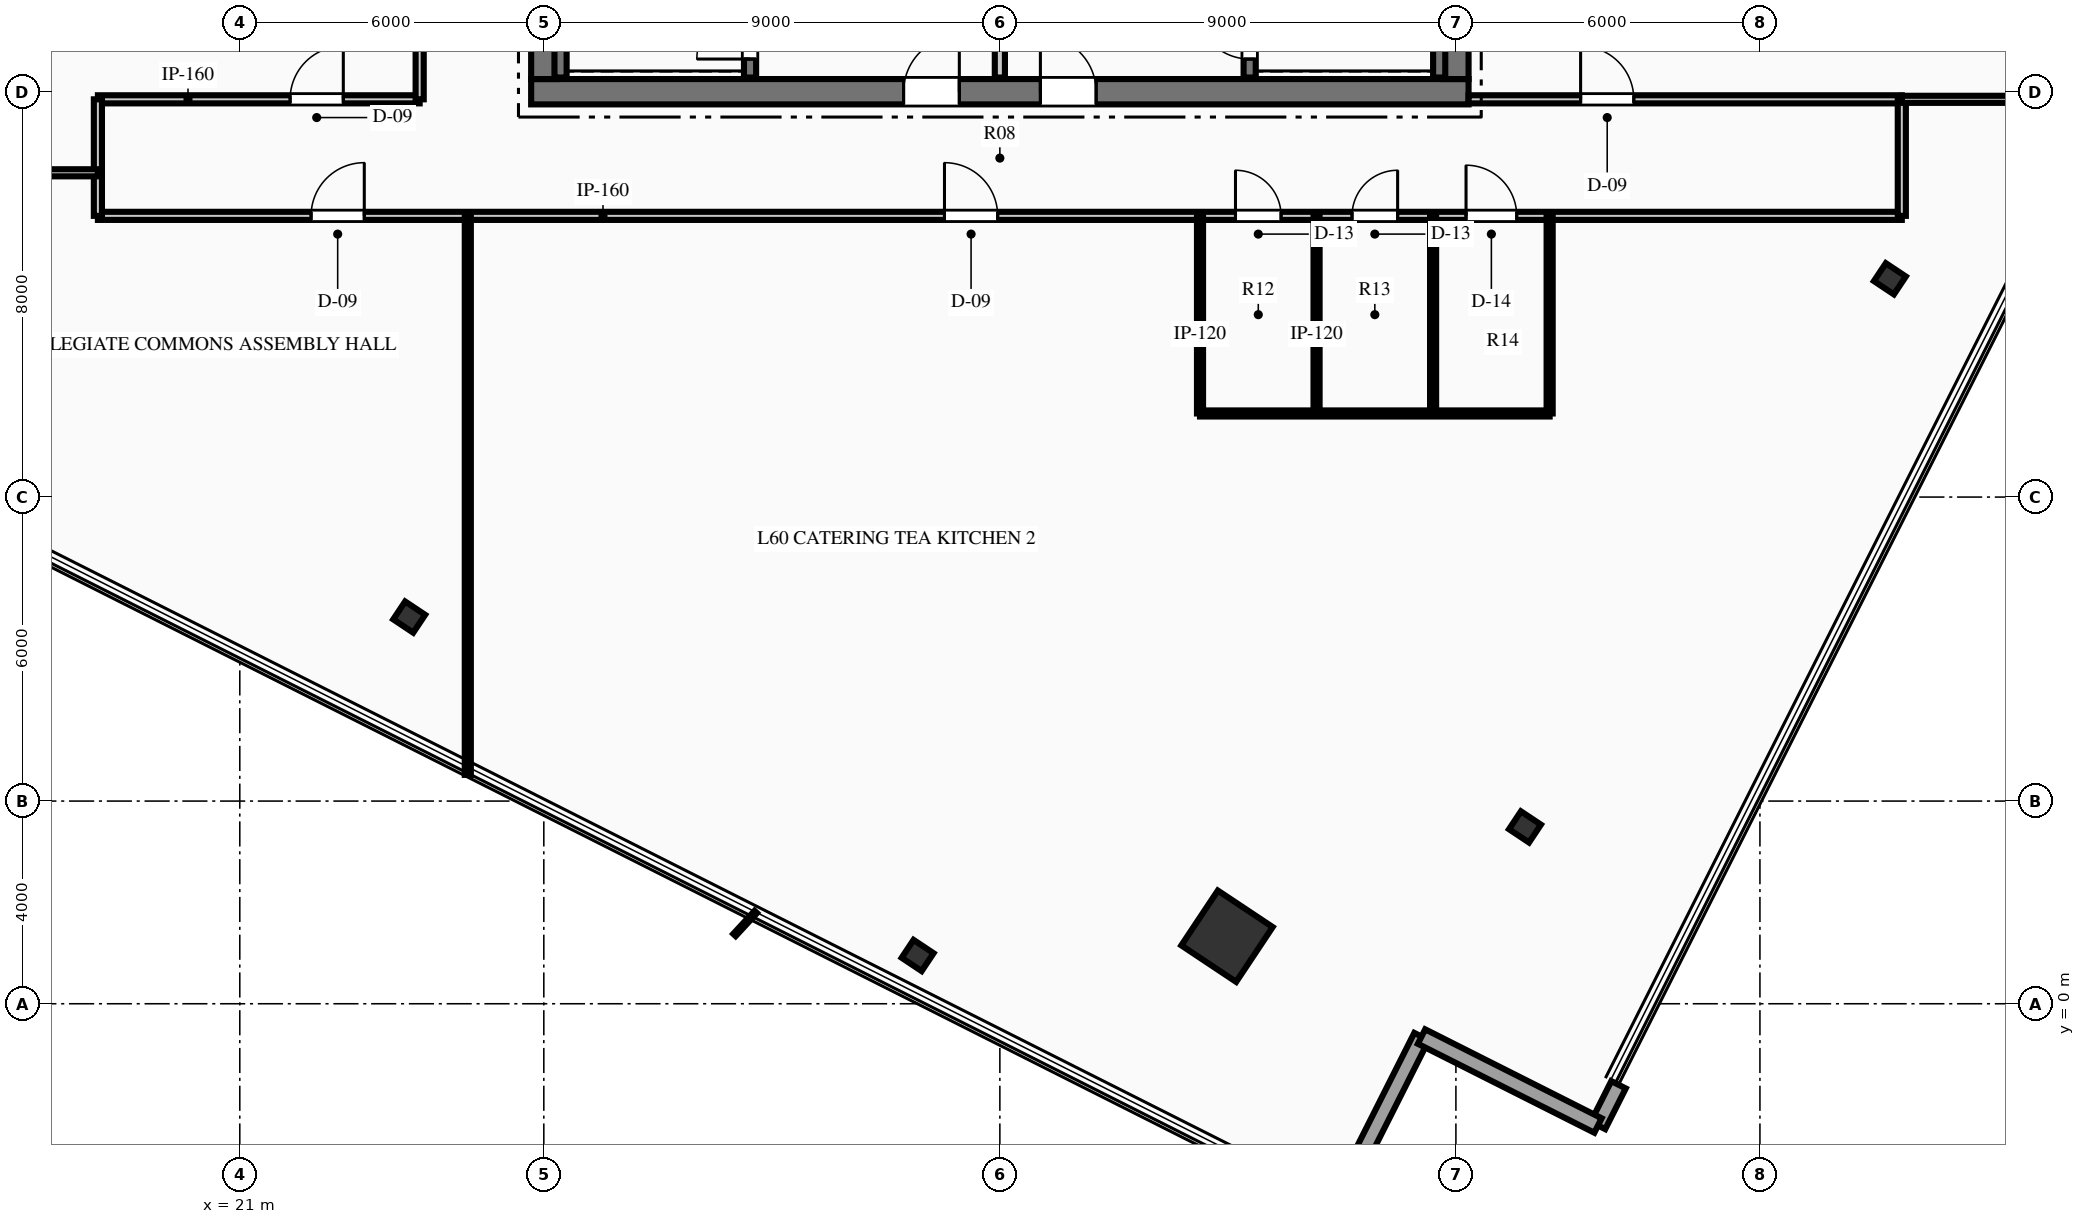
"""IFC4 building model, lengths in metres.
Left out: names, types, materials, properties, quantities, classifications, styles, units other than length and angle.
Written with IfcOpenShell. Run it as: python <this file> out.ifc"""

import sys

from ifc_helpers import new_model, si_unit, direction, frame, frame_2d, origin, origin_2d, place, context, subcontext, project, spatial, rectangle, hollow_rectangle, i_section, extrude, element, fill, save


model = new_model("IFC4")
c1 = context("Model", 3, precision=1e-05, world=origin(), true_north=direction((0.0, 1.0)))
c2 = subcontext(c1, "Body", "Model", "MODEL_VIEW")
j1 = project(units=[si_unit("LENGTHUNIT", "METRE"), si_unit("PLANEANGLEUNIT", "RADIAN")], contexts=[c1])
p1 = place(None, origin())
s1 = spatial("IfcSite", under=j1, at=p1, CompositionType="ELEMENT")
p2 = place(p1, origin())
s2 = spatial("IfcBuilding", under=s1, at=p2, CompositionType="ELEMENT")
p3 = place(p2, frame((0.0, 0.0, 239.7)))
s3 = spatial("IfcBuildingStorey", under=s2, at=p3, CompositionType="ELEMENT", Elevation=239.7)
p4 = place(p3, frame((26.75, 18.0, 0.0), z_axis=(0.0, 0.0, 1.0), x_axis=(1.0, 0.0, 0.0)))
e1 = element("IfcWall", 1, at=p4, inside=s3, PredefinedType="SHEAR", context=c2, shape_type="SweptSolid", body=[
    extrude(rectangle(XDim=18.5, YDim=0.5, at=frame_2d((9.25, 0.0))), origin(), (0.0, 0.0, 1.0), 4.5),
])
p5 = place(p4, frame((7.35, 0.0, 0.0)))
e2 = element("IfcOpeningElement", 2, at=p5, cuts=e1, PredefinedType="OPENING", context=c2, shape_type="SweptSolid", body=[
    extrude(rectangle(XDim=1.1, YDim=2.15, at=frame_2d((0.55, 1.075))), frame((0.0, 0.26, 0.0), z_axis=(0.0, -1.0, 0.0), x_axis=(1.0, 0.0, 0.0)), (0.0, 0.0, 1.0), 0.52),
])
p6 = place(p4, frame((10.05, 0.0, 0.0)))
e3 = element("IfcOpeningElement", 3, at=p6, cuts=e1, PredefinedType="OPENING", context=c2, shape_type="SweptSolid", body=[
    extrude(rectangle(XDim=1.1, YDim=2.15, at=frame_2d((0.55, 1.075))), frame((0.0, 0.26, 0.0), z_axis=(0.0, -1.0, 0.0), x_axis=(1.0, 0.0, 0.0)), (0.0, 0.0, 1.0), 0.52),
])
p7 = place(p3, frame((27.0, 18.25, 0.0), z_axis=(0.0, 0.0, 1.0), x_axis=(0.0, 1.0, 0.0)))
e4 = element("IfcWall", 4, at=p7, inside=s3, PredefinedType="SHEAR", context=c2, shape_type="SweptSolid", body=[
    extrude(rectangle(XDim=15.5, YDim=0.5, at=frame_2d((7.75, 0.0))), origin(), (0.0, 0.0, 1.0), 4.5),
])
p8 = place(p7, frame((9.99, 0.0, 0.0)))
e5 = element("IfcOpeningElement", 5, at=p8, cuts=e4, PredefinedType="OPENING", context=c2, shape_type="SweptSolid", body=[
    extrude(rectangle(XDim=1.4, YDim=2.2, at=frame_2d((0.7, 1.1))), frame((0.0, 0.26, 0.0), z_axis=(0.0, -1.0, 0.0), x_axis=(1.0, 0.0, 0.0)), (0.0, 0.0, 1.0), 0.52),
])
p9 = place(p3, frame((45.0, 18.25, 0.0), z_axis=(0.0, 0.0, 1.0), x_axis=(0.0, 1.0, 0.0)))
e6 = element("IfcWall", 6, at=p9, inside=s3, PredefinedType="SHEAR", context=c2, shape_type="SweptSolid", body=[
    extrude(rectangle(XDim=15.5, YDim=0.5, at=frame_2d((7.75, 0.0))), origin(), (0.0, 0.0, 1.0), 4.5),
])
p10 = place(p9, frame((9.99, 0.0, 0.0)))
e7 = element("IfcOpeningElement", 7, at=p10, cuts=e6, PredefinedType="OPENING", context=c2, shape_type="SweptSolid", body=[
    extrude(rectangle(XDim=1.4, YDim=2.2, at=frame_2d((0.7, 1.1))), frame((0.0, 0.26, 0.0), z_axis=(0.0, -1.0, 0.0), x_axis=(1.0, 0.0, 0.0)), (0.0, 0.0, 1.0), 0.52),
])
p11 = place(p3, frame((31.07, 18.28, 0.0), z_axis=(0.0, 0.0, 1.0), x_axis=(0.0, 1.0, 0.0)))
e8 = element("IfcWall", 8, at=p11, inside=s3, PredefinedType="SHEAR", context=c2, shape_type="SweptSolid", body=[
    extrude(rectangle(XDim=8.26, YDim=0.24, at=frame_2d((4.13, 0.0))), origin(), (0.0, 0.0, 1.0), 4.5),
])
p12 = place(p11, frame((0.365, 0.0, 0.0)))
e9 = element("IfcOpeningElement", 9, at=p12, cuts=e8, PredefinedType="OPENING", context=c2, shape_type="SweptSolid", body=[
    extrude(rectangle(XDim=1.05, YDim=2.15, at=frame_2d((0.525, 1.075))), frame((0.0, 0.13, 0.0), z_axis=(0.0, -1.0, 0.0), x_axis=(1.0, 0.0, 0.0)), (0.0, 0.0, 1.0), 0.26),
])
p13 = place(p3, frame((27.33, 18.28, 0.0), z_axis=(0.0, 0.0, 1.0), x_axis=(0.0, 1.0, 0.0)))
e10 = element("IfcWall", 10, at=p13, inside=s3, PredefinedType="SHEAR", context=c2, shape_type="SweptSolid", body=[
    extrude(rectangle(XDim=8.26, YDim=0.24, at=frame_2d((4.13, 0.0))), origin(), (0.0, 0.0, 1.0), 4.5),
])
p14 = place(p3, frame((40.93, 18.28, 0.0), z_axis=(0.0, 0.0, 1.0), x_axis=(0.0, 1.0, 0.0)))
e11 = element("IfcWall", 11, at=p14, inside=s3, PredefinedType="SHEAR", context=c2, shape_type="SweptSolid", body=[
    extrude(rectangle(XDim=8.26, YDim=0.24, at=frame_2d((4.13, 0.0))), origin(), (0.0, 0.0, 1.0), 4.5),
])
p15 = place(p14, frame((0.365, 0.0, 0.0)))
e12 = element("IfcOpeningElement", 12, at=p15, cuts=e11, PredefinedType="OPENING", context=c2, shape_type="SweptSolid", body=[
    extrude(rectangle(XDim=1.05, YDim=2.15, at=frame_2d((0.525, 1.075))), frame((0.0, 0.13, 0.0), z_axis=(0.0, -1.0, 0.0), x_axis=(1.0, 0.0, 0.0)), (0.0, 0.0, 1.0), 0.26),
])
p16 = place(p3, frame((44.67, 18.28, 0.0), z_axis=(0.0, 0.0, 1.0), x_axis=(0.0, 1.0, 0.0)))
e13 = element("IfcWall", 13, at=p16, inside=s3, PredefinedType="SHEAR", context=c2, shape_type="SweptSolid", body=[
    extrude(rectangle(XDim=8.26, YDim=0.24, at=frame_2d((4.13, 0.0))), origin(), (0.0, 0.0, 1.0), 4.5),
])
p17 = place(p3, frame((40.483, 1.333, 0.0), z_axis=(0.0, 0.0, 1.0), x_axis=(0.554118199338, 0.832437998389, 0.0)))
e14 = element("IfcColumn", 14, at=p17, inside=s3, PredefinedType="COLUMN", context=c2, shape_type="SweptSolid", body=[
    extrude(hollow_rectangle(XDim=1.3, YDim=1.3, WallThickness=0.06, at=origin_2d()), origin(), (0.0, 0.0, 1.0), 4.5),
])
for number, where, z_axis, x_axis in (
    (15, (46.363, 3.49, 0.0), (0.0, 0.0, 1.0), (0.554, 0.832, 0.0)),
    (16, (53.564, 14.308, 0.0), (0.0, 0.0, 1.0), (0.554, 0.832, 0.0)),
    (17, (24.343, 7.631, 0.0), (0.0, 0.0, 1.0), (0.554, 0.832, 0.0)),
    (18, (34.377, 0.952, 0.0), (0.0, 0.0, 1.0), (0.554, 0.832, 0.0)),
):
    element("IfcColumn", number, at=place(p3, frame(where, z_axis=z_axis, x_axis=x_axis)), inside=s3, PredefinedType="COLUMN", context=c2, shape_type="SweptSolid", body=[
        extrude(i_section(OverallWidth=0.424, OverallDepth=0.474, WebThickness=0.048, FlangeThickness=0.077, at=origin_2d()), origin(), (0.0, 0.0, 1.0), 4.5),
    ])
p18 = place(p3, frame((48.209, -1.599, 0.0), z_axis=(0.0, 0.0, 1.0), x_axis=(-0.45024883958, -0.892903120421, 0.0)))
e19 = element("IfcWall", 19, at=p18, inside=s3, PredefinedType="STANDARD", context=c2, shape_type="SweptSolid", body=[
    extrude(rectangle(XDim=0.9, YDim=0.32, at=frame_2d((0.45, 0.0))), origin(), (0.0, 0.0, 1.0), 4.1),
])
p19 = place(p3, frame((44.322, -0.647, 0.0), z_axis=(0.0, 0.0, 1.0), x_axis=(-0.450066097652, -0.892995245085, 0.0)))
e20 = element("IfcWall", 20, at=p19, inside=s3, PredefinedType="STANDARD", context=c2, shape_type="SweptSolid", body=[
    extrude(rectangle(XDim=3.9, YDim=0.32, at=frame_2d((1.95, 0.0))), origin(), (0.0, 0.0, 1.0), 4.1),
])
p20 = place(p3, frame((47.804, -2.403, 0.0), z_axis=(0.0, 0.0, 1.0), x_axis=(-0.892982765682, 0.450090857711, 0.0)))
e21 = element("IfcWall", 21, at=p20, inside=s3, PredefinedType="STANDARD", context=c2, shape_type="SweptSolid", body=[
    extrude(rectangle(XDim=3.9, YDim=0.32, at=frame_2d((1.95, 0.0))), origin(), (0.0, 0.0, 1.0), 4.1),
])
p21 = place(p3, frame((36.0, 18.28, 0.0), z_axis=(0.0, 0.0, 1.0), x_axis=(0.0, 1.0, 0.0)))
e22 = element("IfcWall", 22, at=p21, inside=s3, PredefinedType="PARTITIONING", context=c2, shape_type="SweptSolid", body=[
    extrude(rectangle(XDim=3.77, YDim=0.2, at=frame_2d((1.885, 0.0))), origin(), (0.0, 0.0, 1.0), 4.1),
])
p22 = place(p3, frame((18.2, 15.55, 0.0), z_axis=(0.0, 0.0, 1.0), x_axis=(1.0, 0.0, 0.0)))
e23 = element("IfcWall", 23, at=p22, inside=s3, PredefinedType="PARTITIONING", context=c2, shape_type="SweptSolid", body=[
    extrude(rectangle(XDim=35.6, YDim=0.16, at=frame_2d((17.8, 0.0))), origin(), (0.0, 0.0, 1.0), 2.595),
])
p23 = place(p22, frame((22.45, 0.0, 0.0)))
e24 = element("IfcOpeningElement", 24, at=p23, cuts=e23, PredefinedType="OPENING", context=c2, shape_type="SweptSolid", body=[
    extrude(rectangle(XDim=0.9, YDim=2.15, at=frame_2d((0.45, 1.075))), frame((0.0, 0.09, 0.0), z_axis=(0.0, -1.0, 0.0), x_axis=(1.0, 0.0, 0.0)), (0.0, 0.0, 1.0), 0.18),
])
p24 = place(p22, frame((24.75, 0.0, 0.0)))
e25 = element("IfcOpeningElement", 25, at=p24, cuts=e23, PredefinedType="OPENING", context=c2, shape_type="SweptSolid", body=[
    extrude(rectangle(XDim=0.9, YDim=2.15, at=frame_2d((0.45, 1.075))), frame((0.0, 0.09, 0.0), z_axis=(0.0, -1.0, 0.0), x_axis=(1.0, 0.0, 0.0)), (0.0, 0.0, 1.0), 0.18),
])
p25 = place(p22, frame((27.0, 0.0, 0.0)))
e26 = element("IfcOpeningElement", 26, at=p25, cuts=e23, PredefinedType="OPENING", context=c2, shape_type="SweptSolid", body=[
    extrude(rectangle(XDim=1.0, YDim=2.15, at=frame_2d((0.5, 1.075))), frame((0.0, 0.09, 0.0), z_axis=(0.0, -1.0, 0.0), x_axis=(1.0, 0.0, 0.0)), (0.0, 0.0, 1.0), 0.18),
])
p26 = place(p22, frame((4.207, 0.0, 0.0)))
e27 = element("IfcOpeningElement", 27, at=p26, cuts=e23, PredefinedType="OPENING", context=c2, shape_type="SweptSolid", body=[
    extrude(rectangle(XDim=1.05, YDim=2.15, at=frame_2d((0.525, 1.075))), frame((0.0, 0.09, 0.0), z_axis=(0.0, -1.0, 0.0), x_axis=(1.0, 0.0, 0.0)), (0.0, 0.0, 1.0), 0.18),
])
p27 = place(p22, frame((16.707, 0.0, 0.0)))
e28 = element("IfcOpeningElement", 28, at=p27, cuts=e23, PredefinedType="OPENING", context=c2, shape_type="SweptSolid", body=[
    extrude(rectangle(XDim=1.05, YDim=2.15, at=frame_2d((0.525, 1.075))), frame((0.0, 0.09, 0.0), z_axis=(0.0, -1.0, 0.0), x_axis=(1.0, 0.0, 0.0)), (0.0, 0.0, 1.0), 0.18),
])
p28 = place(p3, frame((18.2, 17.85, 0.0), z_axis=(0.0, 0.0, 1.0), x_axis=(1.0, 0.0, 0.0)))
e29 = element("IfcWall", 29, at=p28, inside=s3, PredefinedType="PARTITIONING", context=c2, shape_type="SweptSolid", body=[
    extrude(rectangle(XDim=6.35, YDim=0.16, at=frame_2d((3.175, 0.0))), origin(), (0.0, 0.0, 1.0), 4.1),
])
p29 = place(p28, frame((3.793, 0.0, 0.0)))
e30 = element("IfcOpeningElement", 30, at=p29, cuts=e29, PredefinedType="OPENING", context=c2, shape_type="SweptSolid", body=[
    extrude(rectangle(XDim=1.05, YDim=2.15, at=frame_2d((0.525, 1.075))), frame((0.0, 0.09, 0.0), z_axis=(0.0, -1.0, 0.0), x_axis=(1.0, 0.0, 0.0)), (0.0, 0.0, 1.0), 0.18),
])
p30 = place(p3, frame((45.25, 17.85, 0.0), z_axis=(0.0, 0.0, 1.0), x_axis=(1.0, 0.0, 0.0)))
e31 = element("IfcWall", 31, at=p30, inside=s3, PredefinedType="PARTITIONING", context=c2, shape_type="SweptSolid", body=[
    extrude(rectangle(XDim=8.55, YDim=0.16, at=frame_2d((4.275, 0.0))), origin(), (0.0, 0.0, 1.0), 4.1),
])
p31 = place(p30, frame((2.211, 0.0, 0.0)))
e32 = element("IfcOpeningElement", 32, at=p31, cuts=e31, PredefinedType="OPENING", context=c2, shape_type="SweptSolid", body=[
    extrude(rectangle(XDim=1.05, YDim=2.15, at=frame_2d((0.525, 1.075))), frame((0.0, 0.09, 0.0), z_axis=(0.0, -1.0, 0.0), x_axis=(1.0, 0.0, 0.0)), (0.0, 0.0, 1.0), 0.18),
])
p32 = place(p3, frame((24.55, 17.85, 0.0), z_axis=(0.0, 0.0, 1.0), x_axis=(0.0, 1.0, 0.0)))
e33 = element("IfcWall", 33, at=p32, inside=s3, PredefinedType="PARTITIONING", context=c2, shape_type="SweptSolid", body=[
    extrude(rectangle(XDim=16.3, YDim=0.16, at=frame_2d((8.15, 0.0))), origin(), (0.0, 0.0, 1.0), 4.1),
])
p33 = place(p32, frame((6.149, 0.0, 0.0)))
e34 = element("IfcOpeningElement", 34, at=p33, cuts=e33, PredefinedType="OPENING", context=c2, shape_type="SweptSolid", body=[
    extrude(rectangle(XDim=1.05, YDim=2.15, at=frame_2d((0.525, 1.075))), frame((0.0, 0.09, 0.0), z_axis=(0.0, -1.0, 0.0), x_axis=(1.0, 0.0, 0.0)), (0.0, 0.0, 1.0), 0.18),
])
for number, where, z_axis, x_axis in (
    (35, (18.2, 15.55, 0.0), (0.0, 0.0, 1.0), (0.0, 1.0, 0.0)),
    (36, (53.8, 15.55, 0.0), (0.0, 0.0, 1.0), (0.0, 1.0, 0.0)),
):
    element("IfcWall", number, at=place(p3, frame(where, z_axis=z_axis, x_axis=x_axis)), inside=s3, PredefinedType="PARTITIONING", context=c2, shape_type="SweptSolid", body=[
        extrude(rectangle(XDim=2.3, YDim=0.16, at=frame_2d((1.15, 0.0))), origin(), (0.0, 0.0, 1.0), 4.1),
    ])
for number, where, z_axis, x_axis in (
    (37, (39.95, 11.65, 0.0), (0.0, 0.0, 1.0), (0.0, 1.0, 0.0)),
    (38, (42.25, 11.65, 0.0), (0.0, 0.0, 1.0), (0.0, 1.0, 0.0)),
    (39, (44.55, 11.65, 0.0), (0.0, 0.0, 1.0), (0.0, 1.0, 0.0)),
    (40, (46.85, 11.65, 0.0), (0.0, 0.0, 1.0), (0.0, 1.0, 0.0)),
):
    element("IfcWall", number, at=place(p3, frame(where, z_axis=z_axis, x_axis=x_axis)), inside=s3, PredefinedType="PARTITIONING", context=c2, shape_type="SweptSolid", body=[
        extrude(rectangle(XDim=3.9, YDim=0.12, at=frame_2d((1.95, 0.0))), origin(), (0.0, 0.0, 1.0), 4.1),
    ])
p34 = place(p3, frame((39.95, 11.65, 0.0), z_axis=(0.0, 0.0, 1.0), x_axis=(1.0, 0.0, 0.0)))
e41 = element("IfcWall", 41, at=p34, inside=s3, PredefinedType="PARTITIONING", context=c2, shape_type="SweptSolid", body=[
    extrude(rectangle(XDim=6.9, YDim=0.12, at=frame_2d((3.45, 0.0))), origin(), (0.0, 0.0, 1.0), 4.1),
])
p35 = place(p3, frame((10.54, 16.4, 0.0), z_axis=(0.0, 0.0, 1.0), x_axis=(1.0, 0.0, 0.0)))
e42 = element("IfcWall", 42, at=p35, inside=s3, PredefinedType="PARTITIONING", context=c2, shape_type="SweptSolid", body=[
    extrude(rectangle(XDim=7.66, YDim=0.14, at=frame_2d((3.83, 0.0))), origin(), (0.0, 0.0, 1.0), 4.1),
])
p36 = place(p3, frame((53.8, 17.85, 0.0), z_axis=(0.0, 0.0, 1.0), x_axis=(1.0, 0.0, 0.0)))
e43 = element("IfcWall", 43, at=p36, inside=s3, PredefinedType="PARTITIONING", context=c2, shape_type="SweptSolid", body=[
    extrude(rectangle(XDim=4.168, YDim=0.14, at=frame_2d((2.084, 0.0))), origin(), (0.0, 0.0, 1.0), 4.1),
])
p37 = place(p3, frame((25.5, 4.517, 0.0), z_axis=(0.0, 0.0, 1.0), x_axis=(0.0, 1.0, 0.0)))
e44 = element("IfcWall", 44, at=p37, inside=s3, PredefinedType="PARTITIONING", context=c2, shape_type="SweptSolid", body=[
    extrude(rectangle(XDim=11.033, YDim=0.12, at=frame_2d((5.517, 0.0))), origin(), (0.0, 0.0, 1.0), 4.1),
])
p38 = place(p12, origin())
e45 = element("IfcDoor", 45, at=p38, inside=s3, OperationType="SINGLE_SWING_LEFT", PredefinedType="DOOR", context=c2, shape_type="SweptSolid", body=[
    extrude(rectangle(XDim=1.05, YDim=2.15, at=frame_2d((0.525, 1.075))), frame((0.0, 0.025, 0.0), z_axis=(0.0, -1.0, 0.0), x_axis=(1.0, 0.0, 0.0)), (0.0, 0.0, 1.0), 0.05),
])
fill(e9, e45)
p39 = place(p15, origin())
e46 = element("IfcDoor", 46, at=p39, inside=s3, OperationType="SINGLE_SWING_RIGHT", PredefinedType="DOOR", context=c2, shape_type="SweptSolid", body=[
    extrude(rectangle(XDim=1.05, YDim=2.15, at=frame_2d((0.525, 1.075))), frame((0.0, 0.025, 0.0), z_axis=(0.0, -1.0, 0.0), x_axis=(1.0, 0.0, 0.0)), (0.0, 0.0, 1.0), 0.05),
])
fill(e12, e46)
p40 = place(p5, origin())
e47 = element("IfcDoor", 47, at=p40, inside=s3, OperationType="SINGLE_SWING_RIGHT", PredefinedType="DOOR", context=c2, shape_type="SweptSolid", body=[
    extrude(rectangle(XDim=1.1, YDim=2.15, at=frame_2d((0.55, 1.075))), frame((0.0, 0.025, 0.0), z_axis=(0.0, -1.0, 0.0), x_axis=(1.0, 0.0, 0.0)), (0.0, 0.0, 1.0), 0.05),
])
fill(e2, e47)
p41 = place(p6, origin())
e48 = element("IfcDoor", 48, at=p41, inside=s3, OperationType="SINGLE_SWING_LEFT", PredefinedType="DOOR", context=c2, shape_type="SweptSolid", body=[
    extrude(rectangle(XDim=1.1, YDim=2.15, at=frame_2d((0.55, 1.075))), frame((0.0, 0.025, 0.0), z_axis=(0.0, -1.0, 0.0), x_axis=(1.0, 0.0, 0.0)), (0.0, 0.0, 1.0), 0.05),
])
fill(e3, e48)
p42 = place(p23, origin())
e49 = element("IfcDoor", 49, at=p42, inside=s3, OperationType="SINGLE_SWING_LEFT", PredefinedType="DOOR", context=c2, shape_type="SweptSolid", body=[
    extrude(rectangle(XDim=0.9, YDim=2.15, at=frame_2d((0.45, 1.075))), frame((0.0, 0.025, 0.0), z_axis=(0.0, -1.0, 0.0), x_axis=(1.0, 0.0, 0.0)), (0.0, 0.0, 1.0), 0.05),
])
fill(e24, e49)
p43 = place(p24, origin())
e50 = element("IfcDoor", 50, at=p43, inside=s3, OperationType="SINGLE_SWING_RIGHT", PredefinedType="DOOR", context=c2, shape_type="SweptSolid", body=[
    extrude(rectangle(XDim=0.9, YDim=2.15, at=frame_2d((0.45, 1.075))), frame((0.0, 0.025, 0.0), z_axis=(0.0, -1.0, 0.0), x_axis=(1.0, 0.0, 0.0)), (0.0, 0.0, 1.0), 0.05),
])
fill(e25, e50)
p44 = place(p25, origin())
e51 = element("IfcDoor", 51, at=p44, inside=s3, OperationType="SINGLE_SWING_LEFT", PredefinedType="DOOR", context=c2, shape_type="SweptSolid", body=[
    extrude(rectangle(XDim=1.0, YDim=2.15, at=frame_2d((0.5, 1.075))), frame((0.0, 0.025, 0.0), z_axis=(0.0, -1.0, 0.0), x_axis=(1.0, 0.0, 0.0)), (0.0, 0.0, 1.0), 0.05),
])
fill(e26, e51)
p45 = place(p26, origin())
e52 = element("IfcDoor", 52, at=p45, inside=s3, OperationType="SINGLE_SWING_RIGHT", PredefinedType="DOOR", context=c2, shape_type="SweptSolid", body=[
    extrude(rectangle(XDim=1.05, YDim=2.15, at=frame_2d((0.525, 1.075))), frame((0.0, 0.025, 0.0), z_axis=(0.0, -1.0, 0.0), x_axis=(1.0, 0.0, 0.0)), (0.0, 0.0, 1.0), 0.05),
])
fill(e27, e52)
p46 = place(p27, origin())
e53 = element("IfcDoor", 53, at=p46, inside=s3, OperationType="SINGLE_SWING_LEFT", PredefinedType="DOOR", context=c2, shape_type="SweptSolid", body=[
    extrude(rectangle(XDim=1.05, YDim=2.15, at=frame_2d((0.525, 1.075))), frame((0.0, 0.025, 0.0), z_axis=(0.0, -1.0, 0.0), x_axis=(1.0, 0.0, 0.0)), (0.0, 0.0, 1.0), 0.05),
])
fill(e28, e53)
p47 = place(p29, origin())
e54 = element("IfcDoor", 54, at=p47, inside=s3, OperationType="SINGLE_SWING_RIGHT", PredefinedType="DOOR", context=c2, shape_type="SweptSolid", body=[
    extrude(rectangle(XDim=1.05, YDim=2.15, at=frame_2d((0.525, 1.075))), frame((0.0, 0.025, 0.0), z_axis=(0.0, -1.0, 0.0), x_axis=(1.0, 0.0, 0.0)), (0.0, 0.0, 1.0), 0.05),
])
fill(e30, e54)
p48 = place(p31, origin())
e55 = element("IfcDoor", 55, at=p48, inside=s3, OperationType="SINGLE_SWING_LEFT", PredefinedType="DOOR", context=c2, shape_type="SweptSolid", body=[
    extrude(rectangle(XDim=1.05, YDim=2.15, at=frame_2d((0.525, 1.075))), frame((0.0, 0.025, 0.0), z_axis=(0.0, -1.0, 0.0), x_axis=(1.0, 0.0, 0.0)), (0.0, 0.0, 1.0), 0.05),
])
fill(e32, e55)
save(model, sys.argv[1])
